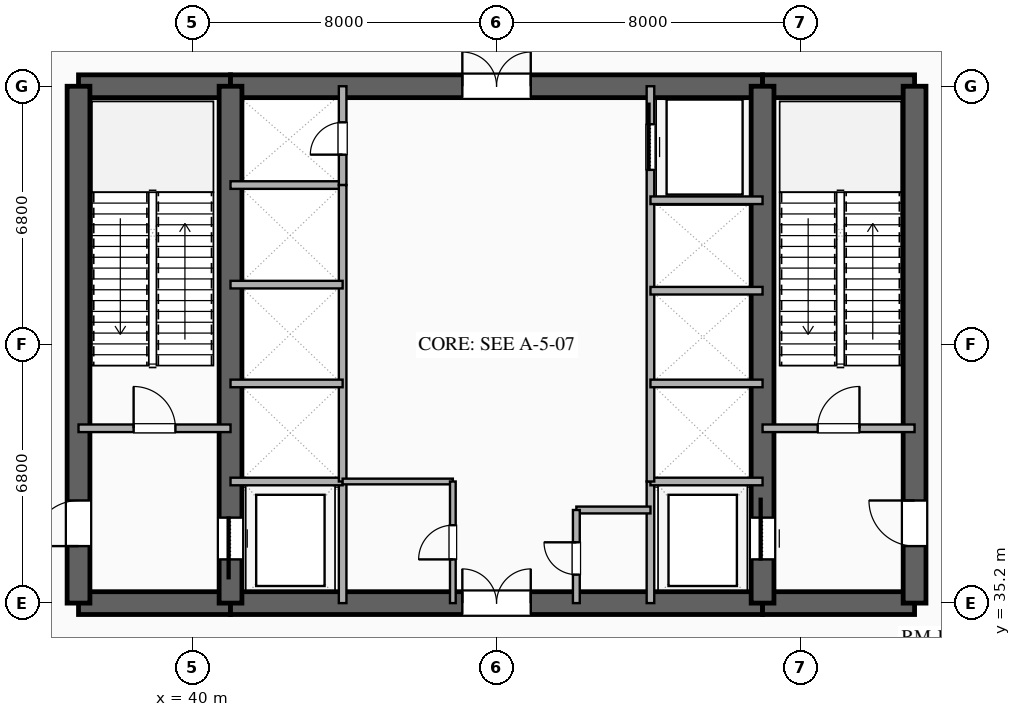
"""IFC4 building model, lengths in metres.
Left out: names, types, materials, properties, quantities, classifications, styles, units other than length and angle.
Written with IfcOpenShell. Run it as: python <this file> out.ifc"""

import sys

from ifc_helpers import new_model, si_unit, direction, frame, frame_2d, origin, place, context, subcontext, project, spatial, rectangle, extrude, element, fill, save


model = new_model("IFC4")
c1 = context("Model", 3, precision=1e-05, world=origin(), true_north=direction((0.0, 1.0)))
c2 = subcontext(c1, "Body", "Model", "MODEL_VIEW")
j1 = project(units=[si_unit("LENGTHUNIT", "METRE"), si_unit("PLANEANGLEUNIT", "RADIAN")], contexts=[c1])
p1 = place(None, origin())
s1 = spatial("IfcSite", under=j1, at=p1, CompositionType="ELEMENT")
p2 = place(p1, origin())
s2 = spatial("IfcBuilding", under=s1, at=p2, CompositionType="ELEMENT")
p3 = place(p2, frame((0.0, 0.0, 22.2)))
s3 = spatial("IfcBuildingStorey", under=s2, at=p3, CompositionType="ELEMENT", Elevation=22.2)
p4 = place(p3, frame((37.0, 35.2, 0.0), z_axis=(0.0, 0.0, 1.0), x_axis=(1.0, 0.0, 0.0)))
e1 = element("IfcWall", 1, at=p4, inside=s3, PredefinedType="SHEAR", context=c2, shape_type="SweptSolid", body=[
    extrude(rectangle(XDim=4.0, YDim=0.6, at=frame_2d((2.0, 0.0))), origin(), (0.0, 0.0, 1.0), 5.75),
])
p5 = place(p3, frame((41.0, 35.2, 0.0), z_axis=(0.0, 0.0, 1.0), x_axis=(1.0, 0.0, 0.0)))
e2 = element("IfcWall", 2, at=p5, inside=s3, PredefinedType="SHEAR", context=c2, shape_type="SweptSolid", body=[
    extrude(rectangle(XDim=14.0, YDim=0.6, at=frame_2d((7.0, 0.0))), origin(), (0.0, 0.0, 1.0), 5.75),
])
p6 = place(p5, frame((6.1, 0.0, 0.0)))
e3 = element("IfcOpeningElement", 3, at=p6, cuts=e2, PredefinedType="OPENING", context=c2, shape_type="SweptSolid", body=[
    extrude(rectangle(XDim=1.8, YDim=2.25, at=frame_2d((0.9, 1.125))), frame((0.0, 0.31, 0.0), z_axis=(0.0, -1.0, 0.0), x_axis=(1.0, 0.0, 0.0)), (0.0, 0.0, 1.0), 0.62),
])
for number, where, z_axis, x_axis in (
    (4, (55.0, 35.2, 0.0), (0.0, 0.0, 1.0), (1.0, 0.0, 0.0)),
    (5, (37.0, 48.8, 0.0), (0.0, 0.0, 1.0), (1.0, 0.0, 0.0)),
):
    element("IfcWall", number, at=place(p3, frame(where, z_axis=z_axis, x_axis=x_axis)), inside=s3, PredefinedType="SHEAR", context=c2, shape_type="SweptSolid", body=[
        extrude(rectangle(XDim=4.0, YDim=0.6, at=frame_2d((2.0, 0.0))), origin(), (0.0, 0.0, 1.0), 5.75),
    ])
p7 = place(p3, frame((41.0, 48.8, 0.0), z_axis=(0.0, 0.0, 1.0), x_axis=(1.0, 0.0, 0.0)))
e6 = element("IfcWall", 6, at=p7, inside=s3, PredefinedType="SHEAR", context=c2, shape_type="SweptSolid", body=[
    extrude(rectangle(XDim=14.0, YDim=0.6, at=frame_2d((7.0, 0.0))), origin(), (0.0, 0.0, 1.0), 5.75),
])
p8 = place(p7, frame((6.1, 0.0, 0.0)))
e7 = element("IfcOpeningElement", 7, at=p8, cuts=e6, PredefinedType="OPENING", context=c2, shape_type="SweptSolid", body=[
    extrude(rectangle(XDim=1.8, YDim=2.25, at=frame_2d((0.9, 1.125))), frame((0.0, 0.31, 0.0), z_axis=(0.0, -1.0, 0.0), x_axis=(1.0, 0.0, 0.0)), (0.0, 0.0, 1.0), 0.62),
])
p9 = place(p3, frame((55.0, 48.8, 0.0), z_axis=(0.0, 0.0, 1.0), x_axis=(1.0, 0.0, 0.0)))
e8 = element("IfcWall", 8, at=p9, inside=s3, PredefinedType="SHEAR", context=c2, shape_type="SweptSolid", body=[
    extrude(rectangle(XDim=4.0, YDim=0.6, at=frame_2d((2.0, 0.0))), origin(), (0.0, 0.0, 1.0), 5.75),
])
p10 = place(p3, frame((37.0, 35.2, 0.0), z_axis=(0.0, 0.0, 1.0), x_axis=(0.0, 1.0, 0.0)))
e9 = element("IfcWall", 9, at=p10, inside=s3, PredefinedType="SHEAR", context=c2, shape_type="SweptSolid", body=[
    extrude(rectangle(XDim=13.6, YDim=0.6, at=frame_2d((6.8, 0.0))), origin(), (0.0, 0.0, 1.0), 5.75),
])
p11 = place(p10, frame((1.5, 0.0, 0.0)))
e10 = element("IfcOpeningElement", 10, at=p11, cuts=e9, PredefinedType="OPENING", context=c2, shape_type="SweptSolid", body=[
    extrude(rectangle(XDim=1.2, YDim=2.15, at=frame_2d((0.6, 1.075))), frame((0.0, 0.31, 0.0), z_axis=(0.0, -1.0, 0.0), x_axis=(1.0, 0.0, 0.0)), (0.0, 0.0, 1.0), 0.62),
])
p12 = place(p3, frame((59.0, 35.2, 0.0), z_axis=(0.0, 0.0, 1.0), x_axis=(0.0, 1.0, 0.0)))
e11 = element("IfcWall", 11, at=p12, inside=s3, PredefinedType="SHEAR", context=c2, shape_type="SweptSolid", body=[
    extrude(rectangle(XDim=13.6, YDim=0.6, at=frame_2d((6.8, 0.0))), origin(), (0.0, 0.0, 1.0), 5.75),
])
p13 = place(p12, frame((1.5, 0.0, 0.0)))
e12 = element("IfcOpeningElement", 12, at=p13, cuts=e11, PredefinedType="OPENING", context=c2, shape_type="SweptSolid", body=[
    extrude(rectangle(XDim=1.2, YDim=2.15, at=frame_2d((0.6, 1.075))), frame((0.0, 0.31, 0.0), z_axis=(0.0, -1.0, 0.0), x_axis=(1.0, 0.0, 0.0)), (0.0, 0.0, 1.0), 0.62),
])
p14 = place(p3, frame((41.0, 35.2, 0.0), z_axis=(0.0, 0.0, 1.0), x_axis=(0.0, 1.0, 0.0)))
e13 = element("IfcWall", 13, at=p14, inside=s3, PredefinedType="SHEAR", context=c2, shape_type="SweptSolid", body=[
    extrude(rectangle(XDim=13.6, YDim=0.6, at=frame_2d((6.8, 0.0))), origin(), (0.0, 0.0, 1.0), 5.75),
])
p15 = place(p14, frame((1.15, 0.0, 0.0)))
e14 = element("IfcOpeningElement", 14, at=p15, cuts=e13, PredefinedType="OPENING", context=c2, shape_type="SweptSolid", body=[
    extrude(rectangle(XDim=1.1, YDim=2.2, at=frame_2d((0.55, 1.1))), frame((0.0, 0.31, 0.0), z_axis=(0.0, -1.0, 0.0), x_axis=(1.0, 0.0, 0.0)), (0.0, 0.0, 1.0), 0.62),
])
p16 = place(p3, frame((55.0, 35.2, 0.0), z_axis=(0.0, 0.0, 1.0), x_axis=(0.0, 1.0, 0.0)))
e15 = element("IfcWall", 15, at=p16, inside=s3, PredefinedType="SHEAR", context=c2, shape_type="SweptSolid", body=[
    extrude(rectangle(XDim=13.6, YDim=0.6, at=frame_2d((6.8, 0.0))), origin(), (0.0, 0.0, 1.0), 5.75),
])
p17 = place(p16, frame((1.15, 0.0, 0.0)))
e16 = element("IfcOpeningElement", 16, at=p17, cuts=e15, PredefinedType="OPENING", context=c2, shape_type="SweptSolid", body=[
    extrude(rectangle(XDim=1.1, YDim=2.2, at=frame_2d((0.55, 1.1))), frame((0.0, 0.31, 0.0), z_axis=(0.0, -1.0, 0.0), x_axis=(1.0, 0.0, 0.0)), (0.0, 0.0, 1.0), 0.62),
])
p18 = place(p3, frame((37.0, 39.8, 0.0), z_axis=(0.0, 0.0, 1.0), x_axis=(1.0, 0.0, 0.0)))
e17 = element("IfcWall", 17, at=p18, inside=s3, PredefinedType="SOLIDWALL", context=c2, shape_type="SweptSolid", body=[
    extrude(rectangle(XDim=4.0, YDim=0.2, at=frame_2d((2.0, 0.0))), origin(), (0.0, 0.0, 1.0), 2.5),
])
p19 = place(p18, frame((1.45, 0.0, 0.0)))
e18 = element("IfcOpeningElement", 18, at=p19, cuts=e17, PredefinedType="OPENING", context=c2, shape_type="SweptSolid", body=[
    extrude(rectangle(XDim=1.1, YDim=2.15, at=frame_2d((0.55, 1.075))), frame((0.0, 0.11, 0.0), z_axis=(0.0, -1.0, 0.0), x_axis=(1.0, 0.0, 0.0)), (0.0, 0.0, 1.0), 0.22),
])
p20 = place(p3, frame((55.0, 39.8, 0.0), z_axis=(0.0, 0.0, 1.0), x_axis=(1.0, 0.0, 0.0)))
e19 = element("IfcWall", 19, at=p20, inside=s3, PredefinedType="SOLIDWALL", context=c2, shape_type="SweptSolid", body=[
    extrude(rectangle(XDim=4.0, YDim=0.2, at=frame_2d((2.0, 0.0))), origin(), (0.0, 0.0, 1.0), 2.5),
])
p21 = place(p20, frame((1.45, 0.0, 0.0)))
e20 = element("IfcOpeningElement", 20, at=p21, cuts=e19, PredefinedType="OPENING", context=c2, shape_type="SweptSolid", body=[
    extrude(rectangle(XDim=1.1, YDim=2.15, at=frame_2d((0.55, 1.075))), frame((0.0, 0.11, 0.0), z_axis=(0.0, -1.0, 0.0), x_axis=(1.0, 0.0, 0.0)), (0.0, 0.0, 1.0), 0.22),
])
p22 = place(p3, frame((43.95, 35.2, 0.0), z_axis=(0.0, 0.0, 1.0), x_axis=(0.0, 1.0, 0.0)))
e21 = element("IfcWall", 21, at=p22, inside=s3, PredefinedType="SOLIDWALL", context=c2, shape_type="SweptSolid", body=[
    extrude(rectangle(XDim=3.2, YDim=0.2, at=frame_2d((1.6, 0.0))), origin(), (0.0, 0.0, 1.0), 2.5),
])
p23 = place(p3, frame((41.0, 38.4, 0.0), z_axis=(0.0, 0.0, 1.0), x_axis=(1.0, 0.0, 0.0)))
e22 = element("IfcWall", 22, at=p23, inside=s3, PredefinedType="SOLIDWALL", context=c2, shape_type="SweptSolid", body=[
    extrude(rectangle(XDim=2.95, YDim=0.2, at=frame_2d((1.475, 0.0))), origin(), (0.0, 0.0, 1.0), 2.5),
])
p24 = place(p3, frame((52.05, 35.2, 0.0), z_axis=(0.0, 0.0, 1.0), x_axis=(0.0, 1.0, 0.0)))
e23 = element("IfcWall", 23, at=p24, inside=s3, PredefinedType="SOLIDWALL", context=c2, shape_type="SweptSolid", body=[
    extrude(rectangle(XDim=3.2, YDim=0.2, at=frame_2d((1.6, 0.0))), origin(), (0.0, 0.0, 1.0), 2.5),
])
for number, where, z_axis, x_axis in (
    (24, (52.05, 38.4, 0.0), (0.0, 0.0, 1.0), (1.0, 0.0, 0.0)),
    (25, (41.0, 46.2, 0.0), (0.0, 0.0, 1.0), (1.0, 0.0, 0.0)),
):
    element("IfcWall", number, at=place(p3, frame(where, z_axis=z_axis, x_axis=x_axis)), inside=s3, PredefinedType="SOLIDWALL", context=c2, shape_type="SweptSolid", body=[
        extrude(rectangle(XDim=2.95, YDim=0.2, at=frame_2d((1.475, 0.0))), origin(), (0.0, 0.0, 1.0), 2.5),
    ])
p25 = place(p3, frame((43.95, 46.2, 0.0), z_axis=(0.0, 0.0, 1.0), x_axis=(0.0, 1.0, 0.0)))
e26 = element("IfcWall", 26, at=p25, inside=s3, PredefinedType="SOLIDWALL", context=c2, shape_type="SweptSolid", body=[
    extrude(rectangle(XDim=2.6, YDim=0.2, at=frame_2d((1.3, 0.0))), origin(), (0.0, 0.0, 1.0), 2.5),
])
p26 = place(p25, frame((0.8, 0.0, 0.0)))
e27 = element("IfcOpeningElement", 27, at=p26, cuts=e26, PredefinedType="OPENING", context=c2, shape_type="SweptSolid", body=[
    extrude(rectangle(XDim=0.85, YDim=2.15, at=frame_2d((0.425, 1.075))), frame((0.0, 0.11, 0.0), z_axis=(0.0, -1.0, 0.0), x_axis=(1.0, 0.0, 0.0)), (0.0, 0.0, 1.0), 0.22),
])
p27 = place(p3, frame((43.95, 38.4, 0.0), z_axis=(0.0, 0.0, 1.0), x_axis=(0.0, 1.0, 0.0)))
e28 = element("IfcWall", 28, at=p27, inside=s3, PredefinedType="SOLIDWALL", context=c2, shape_type="SweptSolid", body=[
    extrude(rectangle(XDim=7.8, YDim=0.2, at=frame_2d((3.9, 0.0))), origin(), (0.0, 0.0, 1.0), 2.5),
])
for number, where, z_axis, x_axis in (
    (29, (41.0, 40.98, 0.0), (0.0, 0.0, 1.0), (1.0, 0.0, 0.0)),
    (30, (41.0, 43.58, 0.0), (0.0, 0.0, 1.0), (1.0, 0.0, 0.0)),
):
    element("IfcWall", number, at=place(p3, frame(where, z_axis=z_axis, x_axis=x_axis)), inside=s3, PredefinedType="SOLIDWALL", context=c2, shape_type="SweptSolid", body=[
        extrude(rectangle(XDim=2.95, YDim=0.2, at=frame_2d((1.475, 0.0))), origin(), (0.0, 0.0, 1.0), 2.5),
    ])
p28 = place(p3, frame((52.05, 38.4, 0.0), z_axis=(0.0, 0.0, 1.0), x_axis=(0.0, 1.0, 0.0)))
e31 = element("IfcWall", 31, at=p28, inside=s3, PredefinedType="SOLIDWALL", context=c2, shape_type="SweptSolid", body=[
    extrude(rectangle(XDim=10.4, YDim=0.2, at=frame_2d((5.2, 0.0))), origin(), (0.0, 0.0, 1.0), 2.5),
])
p29 = place(p28, frame((8.2, 0.0, 0.0)))
e32 = element("IfcOpeningElement", 32, at=p29, cuts=e31, PredefinedType="OPENING", context=c2, shape_type="SweptSolid", body=[
    extrude(rectangle(XDim=1.2, YDim=2.2, at=frame_2d((0.6, 1.1))), frame((0.0, 0.11, 0.0), z_axis=(0.0, -1.0, 0.0), x_axis=(1.0, 0.0, 0.0)), (0.0, 0.0, 1.0), 0.22),
])
for number, where, z_axis, x_axis in (
    (33, (52.05, 40.98, 0.0), (0.0, 0.0, 1.0), (1.0, 0.0, 0.0)),
    (34, (52.05, 43.42, 0.0), (0.0, 0.0, 1.0), (1.0, 0.0, 0.0)),
    (35, (52.05, 45.8, 0.0), (0.0, 0.0, 1.0), (1.0, 0.0, 0.0)),
):
    element("IfcWall", number, at=place(p3, frame(where, z_axis=z_axis, x_axis=x_axis)), inside=s3, PredefinedType="SOLIDWALL", context=c2, shape_type="SweptSolid", body=[
        extrude(rectangle(XDim=2.95, YDim=0.2, at=frame_2d((1.475, 0.0))), origin(), (0.0, 0.0, 1.0), 2.5),
    ])
p30 = place(p3, frame((43.95, 38.4, 0.0), z_axis=(0.0, 0.0, 1.0), x_axis=(1.0, 0.0, 0.0)))
e36 = element("IfcWall", 36, at=p30, inside=s3, PredefinedType="PARTITIONING", context=c2, shape_type="SweptSolid", body=[
    extrude(rectangle(XDim=2.9, YDim=0.15, at=frame_2d((1.45, 0.0))), origin(), (0.0, 0.0, 1.0), 2.5),
])
p31 = place(p3, frame((46.85, 35.2, 0.0), z_axis=(0.0, 0.0, 1.0), x_axis=(0.0, 1.0, 0.0)))
e37 = element("IfcWall", 37, at=p31, inside=s3, PredefinedType="PARTITIONING", context=c2, shape_type="SweptSolid", body=[
    extrude(rectangle(XDim=3.2, YDim=0.15, at=frame_2d((1.6, 0.0))), origin(), (0.0, 0.0, 1.0), 2.5),
])
p32 = place(p31, frame((1.15, 0.0, 0.0)))
e38 = element("IfcOpeningElement", 38, at=p32, cuts=e37, PredefinedType="OPENING", context=c2, shape_type="SweptSolid", body=[
    extrude(rectangle(XDim=0.9, YDim=2.15, at=frame_2d((0.45, 1.075))), frame((0.0, 0.085, 0.0), z_axis=(0.0, -1.0, 0.0), x_axis=(1.0, 0.0, 0.0)), (0.0, 0.0, 1.0), 0.17),
])
p33 = place(p3, frame((50.1, 37.65, 0.0), z_axis=(0.0, 0.0, 1.0), x_axis=(1.0, 0.0, 0.0)))
e39 = element("IfcWall", 39, at=p33, inside=s3, PredefinedType="PLUMBINGWALL", context=c2, shape_type="SweptSolid", body=[
    extrude(rectangle(XDim=1.95, YDim=0.18, at=frame_2d((0.975, 0.0))), origin(), (0.0, 0.0, 1.0), 2.5),
])
p34 = place(p3, frame((50.1, 35.2, 0.0), z_axis=(0.0, 0.0, 1.0), x_axis=(0.0, 1.0, 0.0)))
e40 = element("IfcWall", 40, at=p34, inside=s3, PredefinedType="PLUMBINGWALL", context=c2, shape_type="SweptSolid", body=[
    extrude(rectangle(XDim=2.45, YDim=0.18, at=frame_2d((1.225, 0.0))), origin(), (0.0, 0.0, 1.0), 2.5),
])
p35 = place(p34, frame((0.75, 0.0, 0.0)))
e41 = element("IfcOpeningElement", 41, at=p35, cuts=e40, PredefinedType="OPENING", context=c2, shape_type="SweptSolid", body=[
    extrude(rectangle(XDim=0.85, YDim=2.1, at=frame_2d((0.425, 1.05))), frame((0.0, 0.1, 0.0), z_axis=(0.0, -1.0, 0.0), x_axis=(1.0, 0.0, 0.0)), (0.0, 0.0, 1.0), 0.2),
])
p36 = place(p15, origin())
e42 = element("IfcDoor", 42, at=p36, inside=s3, OperationType="SLIDING_TO_LEFT", PredefinedType="DOOR", context=c2, shape_type="SweptSolid", body=[
    extrude(rectangle(XDim=1.1, YDim=2.2, at=frame_2d((0.55, 1.1))), frame((0.0, 0.025, 0.0), z_axis=(0.0, -1.0, 0.0), x_axis=(1.0, 0.0, 0.0)), (0.0, 0.0, 1.0), 0.05),
])
fill(e14, e42)
p37 = place(p17, origin())
e43 = element("IfcDoor", 43, at=p37, inside=s3, OperationType="SLIDING_TO_RIGHT", PredefinedType="DOOR", context=c2, shape_type="SweptSolid", body=[
    extrude(rectangle(XDim=1.1, YDim=2.2, at=frame_2d((0.55, 1.1))), frame((0.0, 0.025, 0.0), z_axis=(0.0, -1.0, 0.0), x_axis=(1.0, 0.0, 0.0)), (0.0, 0.0, 1.0), 0.05),
])
fill(e16, e43)
p38 = place(p11, origin())
e44 = element("IfcDoor", 44, at=p38, inside=s3, OperationType="SINGLE_SWING_LEFT", PredefinedType="DOOR", context=c2, shape_type="SweptSolid", body=[
    extrude(rectangle(XDim=1.2, YDim=2.15, at=frame_2d((0.6, 1.075))), frame((0.0, 0.025, 0.0), z_axis=(0.0, -1.0, 0.0), x_axis=(1.0, 0.0, 0.0)), (0.0, 0.0, 1.0), 0.05),
])
fill(e10, e44)
p39 = place(p13, origin())
e45 = element("IfcDoor", 45, at=p39, inside=s3, OperationType="SINGLE_SWING_RIGHT", PredefinedType="DOOR", context=c2, shape_type="SweptSolid", body=[
    extrude(rectangle(XDim=1.2, YDim=2.15, at=frame_2d((0.6, 1.075))), frame((0.0, 0.025, 0.0), z_axis=(0.0, -1.0, 0.0), x_axis=(1.0, 0.0, 0.0)), (0.0, 0.0, 1.0), 0.05),
])
fill(e12, e45)
p40 = place(p6, origin())
e46 = element("IfcDoor", 46, at=p40, inside=s3, OperationType="DOUBLE_DOOR_SINGLE_SWING", PredefinedType="DOOR", context=c2, shape_type="SweptSolid", body=[
    extrude(rectangle(XDim=1.8, YDim=2.25, at=frame_2d((0.9, 1.125))), frame((0.0, 0.025, 0.0), z_axis=(0.0, -1.0, 0.0), x_axis=(1.0, 0.0, 0.0)), (0.0, 0.0, 1.0), 0.05),
])
fill(e3, e46)
p41 = place(p8, origin())
e47 = element("IfcDoor", 47, at=p41, inside=s3, OperationType="DOUBLE_DOOR_SINGLE_SWING", PredefinedType="DOOR", context=c2, shape_type="SweptSolid", body=[
    extrude(rectangle(XDim=1.8, YDim=2.25, at=frame_2d((0.9, 1.125))), frame((0.0, 0.025, 0.0), z_axis=(0.0, -1.0, 0.0), x_axis=(1.0, 0.0, 0.0)), (0.0, 0.0, 1.0), 0.05),
])
fill(e7, e47)
p42 = place(p19, origin())
e48 = element("IfcDoor", 48, at=p42, inside=s3, OperationType="SINGLE_SWING_LEFT", PredefinedType="DOOR", context=c2, shape_type="SweptSolid", body=[
    extrude(rectangle(XDim=1.1, YDim=2.15, at=frame_2d((0.55, 1.075))), frame((0.0, 0.025, 0.0), z_axis=(0.0, -1.0, 0.0), x_axis=(1.0, 0.0, 0.0)), (0.0, 0.0, 1.0), 0.05),
])
fill(e18, e48)
p43 = place(p21, origin())
e49 = element("IfcDoor", 49, at=p43, inside=s3, OperationType="SINGLE_SWING_RIGHT", PredefinedType="DOOR", context=c2, shape_type="SweptSolid", body=[
    extrude(rectangle(XDim=1.1, YDim=2.15, at=frame_2d((0.55, 1.075))), frame((0.0, 0.025, 0.0), z_axis=(0.0, -1.0, 0.0), x_axis=(1.0, 0.0, 0.0)), (0.0, 0.0, 1.0), 0.05),
])
fill(e20, e49)
p44 = place(p26, origin())
e50 = element("IfcDoor", 50, at=p44, inside=s3, OperationType="SINGLE_SWING_LEFT", PredefinedType="DOOR", context=c2, shape_type="SweptSolid", body=[
    extrude(rectangle(XDim=0.85, YDim=2.15, at=frame_2d((0.425, 1.075))), frame((0.0, 0.025, 0.0), z_axis=(0.0, -1.0, 0.0), x_axis=(1.0, 0.0, 0.0)), (0.0, 0.0, 1.0), 0.05),
])
fill(e27, e50)
p45 = place(p29, origin())
e51 = element("IfcDoor", 51, at=p45, inside=s3, OperationType="SLIDING_TO_RIGHT", PredefinedType="DOOR", context=c2, shape_type="SweptSolid", body=[
    extrude(rectangle(XDim=1.2, YDim=2.2, at=frame_2d((0.6, 1.1))), frame((0.0, 0.025, 0.0), z_axis=(0.0, -1.0, 0.0), x_axis=(1.0, 0.0, 0.0)), (0.0, 0.0, 1.0), 0.05),
])
fill(e32, e51)
p46 = place(p32, origin())
e52 = element("IfcDoor", 52, at=p46, inside=s3, OperationType="SINGLE_SWING_LEFT", PredefinedType="DOOR", context=c2, shape_type="SweptSolid", body=[
    extrude(rectangle(XDim=0.9, YDim=2.15, at=frame_2d((0.45, 1.075))), frame((0.0, 0.025, 0.0), z_axis=(0.0, -1.0, 0.0), x_axis=(1.0, 0.0, 0.0)), (0.0, 0.0, 1.0), 0.05),
])
fill(e38, e52)
p47 = place(p35, origin())
e53 = element("IfcDoor", 53, at=p47, inside=s3, OperationType="SINGLE_SWING_RIGHT", PredefinedType="DOOR", context=c2, shape_type="SweptSolid", body=[
    extrude(rectangle(XDim=0.85, YDim=2.1, at=frame_2d((0.425, 1.05))), frame((0.0, 0.025, 0.0), z_axis=(0.0, -1.0, 0.0), x_axis=(1.0, 0.0, 0.0)), (0.0, 0.0, 1.0), 0.05),
])
fill(e41, e53)
save(model, sys.argv[1])
